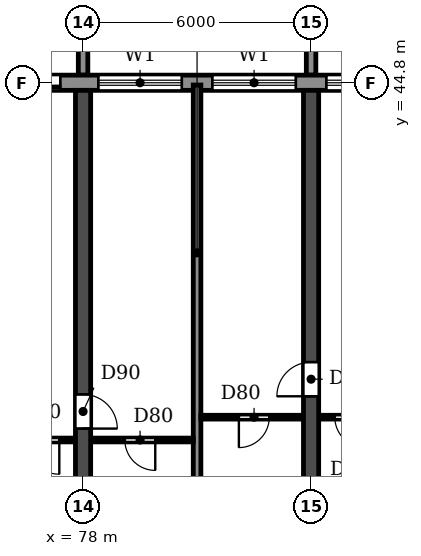
"""IFC4 building model, lengths in metres.
Left out: names, types, materials, properties, quantities, classifications, styles, units other than length and angle.
Written with IfcOpenShell. Run it as: python <this file> out.ifc"""

import sys

from ifc_helpers import new_model, si_unit, direction, frame, frame_2d, origin, place, context, subcontext, project, spatial, polyline, rectangle, outline, extrude, source, transform, mapped, element, fill, save


model = new_model("IFC4")
c1 = context("Model", 3, precision=1e-05, world=origin(), true_north=direction((0.0, 1.0)))
c2 = subcontext(c1, "Body", "Model", "MODEL_VIEW")
j1 = project(units=[si_unit("LENGTHUNIT", "METRE"), si_unit("PLANEANGLEUNIT", "RADIAN")], contexts=[c1])
p1 = place(None, origin())
s1 = spatial("IfcSite", under=j1, at=p1, CompositionType="ELEMENT")
p2 = place(p1, origin())
s2 = spatial("IfcBuilding", under=s1, at=p2, CompositionType="ELEMENT")
p3 = place(p2, frame((0.0, 0.0, 26.7)))
s3 = spatial("IfcBuildingStorey", under=s2, at=p3, CompositionType="ELEMENT", Elevation=26.7)
p4 = place(p3, frame((78.0, 30.55, 0.0), z_axis=(0.0, 0.0, 1.0), x_axis=(0.0, 1.0, 0.0)))
e1 = element("IfcWall", 1, at=p4, inside=s3, PredefinedType="SHEAR", context=c2, shape_type="SweptSolid", body=[
    extrude(rectangle(XDim=14.05, YDim=0.4, at=frame_2d((7.025, 0.0))), origin(), (0.0, 0.0, 1.0), 3.05),
])
p5 = place(p4, frame((5.15, 0.0, 0.0)))
e2 = element("IfcOpeningElement", 2, at=p5, cuts=e1, PredefinedType="OPENING", context=c2, shape_type="SweptSolid", body=[
    extrude(rectangle(XDim=0.9, YDim=2.1, at=frame_2d((0.45, 1.05))), frame((0.0, 0.21, 0.0), z_axis=(0.0, -1.0, 0.0), x_axis=(1.0, 0.0, 0.0)), (0.0, 0.0, 1.0), 0.42),
])
p6 = place(p3, frame((84.0, 30.55, 0.0), z_axis=(0.0, 0.0, 1.0), x_axis=(0.0, 1.0, 0.0)))
e3 = element("IfcWall", 3, at=p6, inside=s3, PredefinedType="SHEAR", context=c2, shape_type="SweptSolid", body=[
    extrude(rectangle(XDim=14.05, YDim=0.4, at=frame_2d((7.025, 0.0))), origin(), (0.0, 0.0, 1.0), 3.05),
])
p7 = place(p6, frame((6.0, 0.0, 0.0)))
e4 = element("IfcOpeningElement", 4, at=p7, cuts=e3, PredefinedType="OPENING", context=c2, shape_type="SweptSolid", body=[
    extrude(rectangle(XDim=0.9, YDim=2.1, at=frame_2d((0.45, 1.05))), frame((0.0, 0.21, 0.0), z_axis=(0.0, -1.0, 0.0), x_axis=(1.0, 0.0, 0.0)), (0.0, 0.0, 1.0), 0.42),
])
p8 = place(p3, frame((97.317, 44.8, 0.0), z_axis=(0.0, 0.0, 1.0), x_axis=(-1.0, 0.0, 0.0)))
e5 = element("IfcWall", 5, at=p8, inside=s3, PredefinedType="STANDARD", context=c2, shape_type="SweptSolid", body=[
    extrude(rectangle(XDim=92.634, YDim=0.4, at=frame_2d((46.317, 0.0))), origin(), (0.0, 0.0, 1.0), 3.05),
])
p9 = place(p8, frame((88.717, 0.0, 0.9)))
e6 = element("IfcOpeningElement", 6, at=p9, cuts=e5, PredefinedType="OPENING", context=c2, shape_type="SweptSolid", body=[
    extrude(rectangle(XDim=2.2, YDim=1.5, at=frame_2d((1.1, 0.75))), frame((0.0, 0.21, 0.0), z_axis=(0.0, -1.0, 0.0), x_axis=(1.0, 0.0, 0.0)), (0.0, 0.0, 1.0), 0.42),
])
p10 = place(p8, frame((85.917, 0.0, 0.0)))
e7 = element("IfcOpeningElement", 7, at=p10, cuts=e5, PredefinedType="OPENING", context=c2, shape_type="SweptSolid", body=[
    extrude(rectangle(XDim=1.8, YDim=2.4, at=frame_2d((0.9, 1.2))), frame((0.0, 0.21, 0.0), z_axis=(0.0, -1.0, 0.0), x_axis=(1.0, 0.0, 0.0)), (0.0, 0.0, 1.0), 0.42),
])
p11 = place(p8, frame((82.717, 0.0, 0.9)))
e8 = element("IfcOpeningElement", 8, at=p11, cuts=e5, PredefinedType="OPENING", context=c2, shape_type="SweptSolid", body=[
    extrude(rectangle(XDim=2.2, YDim=1.5, at=frame_2d((1.1, 0.75))), frame((0.0, 0.21, 0.0), z_axis=(0.0, -1.0, 0.0), x_axis=(1.0, 0.0, 0.0)), (0.0, 0.0, 1.0), 0.42),
])
p12 = place(p8, frame((79.717, 0.0, 0.9)))
e9 = element("IfcOpeningElement", 9, at=p12, cuts=e5, PredefinedType="OPENING", context=c2, shape_type="SweptSolid", body=[
    extrude(rectangle(XDim=2.2, YDim=1.5, at=frame_2d((1.1, 0.75))), frame((0.0, 0.21, 0.0), z_axis=(0.0, -1.0, 0.0), x_axis=(1.0, 0.0, 0.0)), (0.0, 0.0, 1.0), 0.42),
])
p13 = place(p8, frame((76.917, 0.0, 0.0)))
e10 = element("IfcOpeningElement", 10, at=p13, cuts=e5, PredefinedType="OPENING", context=c2, shape_type="SweptSolid", body=[
    extrude(rectangle(XDim=1.8, YDim=2.4, at=frame_2d((0.9, 1.2))), frame((0.0, 0.21, 0.0), z_axis=(0.0, -1.0, 0.0), x_axis=(1.0, 0.0, 0.0)), (0.0, 0.0, 1.0), 0.42),
])
p14 = place(p8, frame((73.717, 0.0, 0.9)))
e11 = element("IfcOpeningElement", 11, at=p14, cuts=e5, PredefinedType="OPENING", context=c2, shape_type="SweptSolid", body=[
    extrude(rectangle(XDim=2.2, YDim=1.5, at=frame_2d((1.1, 0.75))), frame((0.0, 0.21, 0.0), z_axis=(0.0, -1.0, 0.0), x_axis=(1.0, 0.0, 0.0)), (0.0, 0.0, 1.0), 0.42),
])
p15 = place(p8, frame((70.717, 0.0, 0.9)))
e12 = element("IfcOpeningElement", 12, at=p15, cuts=e5, PredefinedType="OPENING", context=c2, shape_type="SweptSolid", body=[
    extrude(rectangle(XDim=2.2, YDim=1.5, at=frame_2d((1.1, 0.75))), frame((0.0, 0.21, 0.0), z_axis=(0.0, -1.0, 0.0), x_axis=(1.0, 0.0, 0.0)), (0.0, 0.0, 1.0), 0.42),
])
p16 = place(p8, frame((67.717, 0.0, 0.9)))
e13 = element("IfcOpeningElement", 13, at=p16, cuts=e5, PredefinedType="OPENING", context=c2, shape_type="SweptSolid", body=[
    extrude(rectangle(XDim=2.2, YDim=1.5, at=frame_2d((1.1, 0.75))), frame((0.0, 0.21, 0.0), z_axis=(0.0, -1.0, 0.0), x_axis=(1.0, 0.0, 0.0)), (0.0, 0.0, 1.0), 0.42),
])
p17 = place(p8, frame((64.917, 0.0, 0.0)))
e14 = element("IfcOpeningElement", 14, at=p17, cuts=e5, PredefinedType="OPENING", context=c2, shape_type="SweptSolid", body=[
    extrude(rectangle(XDim=1.8, YDim=2.4, at=frame_2d((0.9, 1.2))), frame((0.0, 0.21, 0.0), z_axis=(0.0, -1.0, 0.0), x_axis=(1.0, 0.0, 0.0)), (0.0, 0.0, 1.0), 0.42),
])
p18 = place(p8, frame((61.717, 0.0, 0.9)))
e15 = element("IfcOpeningElement", 15, at=p18, cuts=e5, PredefinedType="OPENING", context=c2, shape_type="SweptSolid", body=[
    extrude(rectangle(XDim=2.2, YDim=1.5, at=frame_2d((1.1, 0.75))), frame((0.0, 0.21, 0.0), z_axis=(0.0, -1.0, 0.0), x_axis=(1.0, 0.0, 0.0)), (0.0, 0.0, 1.0), 0.42),
])
p19 = place(p8, frame((58.717, 0.0, 0.9)))
e16 = element("IfcOpeningElement", 16, at=p19, cuts=e5, PredefinedType="OPENING", context=c2, shape_type="SweptSolid", body=[
    extrude(rectangle(XDim=2.2, YDim=1.5, at=frame_2d((1.1, 0.75))), frame((0.0, 0.21, 0.0), z_axis=(0.0, -1.0, 0.0), x_axis=(1.0, 0.0, 0.0)), (0.0, 0.0, 1.0), 0.42),
])
p20 = place(p8, frame((55.917, 0.0, 0.0)))
e17 = element("IfcOpeningElement", 17, at=p20, cuts=e5, PredefinedType="OPENING", context=c2, shape_type="SweptSolid", body=[
    extrude(rectangle(XDim=1.8, YDim=2.4, at=frame_2d((0.9, 1.2))), frame((0.0, 0.21, 0.0), z_axis=(0.0, -1.0, 0.0), x_axis=(1.0, 0.0, 0.0)), (0.0, 0.0, 1.0), 0.42),
])
p21 = place(p8, frame((52.917, 0.0, 0.0)))
e18 = element("IfcOpeningElement", 18, at=p21, cuts=e5, PredefinedType="OPENING", context=c2, shape_type="SweptSolid", body=[
    extrude(rectangle(XDim=1.8, YDim=2.4, at=frame_2d((0.9, 1.2))), frame((0.0, 0.21, 0.0), z_axis=(0.0, -1.0, 0.0), x_axis=(1.0, 0.0, 0.0)), (0.0, 0.0, 1.0), 0.42),
])
p22 = place(p8, frame((49.717, 0.0, 0.9)))
e19 = element("IfcOpeningElement", 19, at=p22, cuts=e5, PredefinedType="OPENING", context=c2, shape_type="SweptSolid", body=[
    extrude(rectangle(XDim=2.2, YDim=1.5, at=frame_2d((1.1, 0.75))), frame((0.0, 0.21, 0.0), z_axis=(0.0, -1.0, 0.0), x_axis=(1.0, 0.0, 0.0)), (0.0, 0.0, 1.0), 0.42),
])
p23 = place(p8, frame((46.917, 0.0, 0.0)))
e20 = element("IfcOpeningElement", 20, at=p23, cuts=e5, PredefinedType="OPENING", context=c2, shape_type="SweptSolid", body=[
    extrude(rectangle(XDim=1.8, YDim=2.4, at=frame_2d((0.9, 1.2))), frame((0.0, 0.21, 0.0), z_axis=(0.0, -1.0, 0.0), x_axis=(1.0, 0.0, 0.0)), (0.0, 0.0, 1.0), 0.42),
])
p24 = place(p8, frame((43.717, 0.0, 0.9)))
e21 = element("IfcOpeningElement", 21, at=p24, cuts=e5, PredefinedType="OPENING", context=c2, shape_type="SweptSolid", body=[
    extrude(rectangle(XDim=2.2, YDim=1.5, at=frame_2d((1.1, 0.75))), frame((0.0, 0.21, 0.0), z_axis=(0.0, -1.0, 0.0), x_axis=(1.0, 0.0, 0.0)), (0.0, 0.0, 1.0), 0.42),
])
p25 = place(p8, frame((40.717, 0.0, 0.9)))
e22 = element("IfcOpeningElement", 22, at=p25, cuts=e5, PredefinedType="OPENING", context=c2, shape_type="SweptSolid", body=[
    extrude(rectangle(XDim=2.2, YDim=1.5, at=frame_2d((1.1, 0.75))), frame((0.0, 0.21, 0.0), z_axis=(0.0, -1.0, 0.0), x_axis=(1.0, 0.0, 0.0)), (0.0, 0.0, 1.0), 0.42),
])
p26 = place(p8, frame((37.917, 0.0, 0.0)))
e23 = element("IfcOpeningElement", 23, at=p26, cuts=e5, PredefinedType="OPENING", context=c2, shape_type="SweptSolid", body=[
    extrude(rectangle(XDim=1.8, YDim=2.4, at=frame_2d((0.9, 1.2))), frame((0.0, 0.21, 0.0), z_axis=(0.0, -1.0, 0.0), x_axis=(1.0, 0.0, 0.0)), (0.0, 0.0, 1.0), 0.42),
])
p27 = place(p8, frame((34.917, 0.0, 0.0)))
e24 = element("IfcOpeningElement", 24, at=p27, cuts=e5, PredefinedType="OPENING", context=c2, shape_type="SweptSolid", body=[
    extrude(rectangle(XDim=1.8, YDim=2.4, at=frame_2d((0.9, 1.2))), frame((0.0, 0.21, 0.0), z_axis=(0.0, -1.0, 0.0), x_axis=(1.0, 0.0, 0.0)), (0.0, 0.0, 1.0), 0.42),
])
p28 = place(p8, frame((31.717, 0.0, 0.9)))
e25 = element("IfcOpeningElement", 25, at=p28, cuts=e5, PredefinedType="OPENING", context=c2, shape_type="SweptSolid", body=[
    extrude(rectangle(XDim=2.2, YDim=1.5, at=frame_2d((1.1, 0.75))), frame((0.0, 0.21, 0.0), z_axis=(0.0, -1.0, 0.0), x_axis=(1.0, 0.0, 0.0)), (0.0, 0.0, 1.0), 0.42),
])
p29 = place(p8, frame((28.717, 0.0, 0.9)))
e26 = element("IfcOpeningElement", 26, at=p29, cuts=e5, PredefinedType="OPENING", context=c2, shape_type="SweptSolid", body=[
    extrude(rectangle(XDim=2.2, YDim=1.5, at=frame_2d((1.1, 0.75))), frame((0.0, 0.21, 0.0), z_axis=(0.0, -1.0, 0.0), x_axis=(1.0, 0.0, 0.0)), (0.0, 0.0, 1.0), 0.42),
])
p30 = place(p8, frame((25.717, 0.0, 0.9)))
e27 = element("IfcOpeningElement", 27, at=p30, cuts=e5, PredefinedType="OPENING", context=c2, shape_type="SweptSolid", body=[
    extrude(rectangle(XDim=2.2, YDim=1.5, at=frame_2d((1.1, 0.75))), frame((0.0, 0.21, 0.0), z_axis=(0.0, -1.0, 0.0), x_axis=(1.0, 0.0, 0.0)), (0.0, 0.0, 1.0), 0.42),
])
p31 = place(p8, frame((22.717, 0.0, 0.9)))
e28 = element("IfcOpeningElement", 28, at=p31, cuts=e5, PredefinedType="OPENING", context=c2, shape_type="SweptSolid", body=[
    extrude(rectangle(XDim=2.2, YDim=1.5, at=frame_2d((1.1, 0.75))), frame((0.0, 0.21, 0.0), z_axis=(0.0, -1.0, 0.0), x_axis=(1.0, 0.0, 0.0)), (0.0, 0.0, 1.0), 0.42),
])
p32 = place(p8, frame((19.917, 0.0, 0.0)))
e29 = element("IfcOpeningElement", 29, at=p32, cuts=e5, PredefinedType="OPENING", context=c2, shape_type="SweptSolid", body=[
    extrude(rectangle(XDim=1.8, YDim=2.4, at=frame_2d((0.9, 1.2))), frame((0.0, 0.21, 0.0), z_axis=(0.0, -1.0, 0.0), x_axis=(1.0, 0.0, 0.0)), (0.0, 0.0, 1.0), 0.42),
])
p33 = place(p8, frame((16.717, 0.0, 0.9)))
e30 = element("IfcOpeningElement", 30, at=p33, cuts=e5, PredefinedType="OPENING", context=c2, shape_type="SweptSolid", body=[
    extrude(rectangle(XDim=2.2, YDim=1.5, at=frame_2d((1.1, 0.75))), frame((0.0, 0.21, 0.0), z_axis=(0.0, -1.0, 0.0), x_axis=(1.0, 0.0, 0.0)), (0.0, 0.0, 1.0), 0.42),
])
p34 = place(p8, frame((13.717, 0.0, 0.9)))
e31 = element("IfcOpeningElement", 31, at=p34, cuts=e5, PredefinedType="OPENING", context=c2, shape_type="SweptSolid", body=[
    extrude(rectangle(XDim=2.2, YDim=1.5, at=frame_2d((1.1, 0.75))), frame((0.0, 0.21, 0.0), z_axis=(0.0, -1.0, 0.0), x_axis=(1.0, 0.0, 0.0)), (0.0, 0.0, 1.0), 0.42),
])
p35 = place(p8, frame((10.717, 0.0, 0.9)))
e32 = element("IfcOpeningElement", 32, at=p35, cuts=e5, PredefinedType="OPENING", context=c2, shape_type="SweptSolid", body=[
    extrude(rectangle(XDim=2.2, YDim=1.5, at=frame_2d((1.1, 0.75))), frame((0.0, 0.21, 0.0), z_axis=(0.0, -1.0, 0.0), x_axis=(1.0, 0.0, 0.0)), (0.0, 0.0, 1.0), 0.42),
])
p36 = place(p8, frame((7.917, 0.0, 0.0)))
e33 = element("IfcOpeningElement", 33, at=p36, cuts=e5, PredefinedType="OPENING", context=c2, shape_type="SweptSolid", body=[
    extrude(rectangle(XDim=1.8, YDim=2.4, at=frame_2d((0.9, 1.2))), frame((0.0, 0.21, 0.0), z_axis=(0.0, -1.0, 0.0), x_axis=(1.0, 0.0, 0.0)), (0.0, 0.0, 1.0), 0.42),
])
p37 = place(p8, frame((4.917, 0.0, 0.0)))
e34 = element("IfcOpeningElement", 34, at=p37, cuts=e5, PredefinedType="OPENING", context=c2, shape_type="SweptSolid", body=[
    extrude(rectangle(XDim=1.8, YDim=2.4, at=frame_2d((0.9, 1.2))), frame((0.0, 0.21, 0.0), z_axis=(0.0, -1.0, 0.0), x_axis=(1.0, 0.0, 0.0)), (0.0, 0.0, 1.0), 0.42),
])
p38 = place(p8, frame((1.717, 0.0, 0.9)))
e35 = element("IfcOpeningElement", 35, at=p38, cuts=e5, PredefinedType="OPENING", context=c2, shape_type="SweptSolid", body=[
    extrude(rectangle(XDim=2.2, YDim=1.5, at=frame_2d((1.1, 0.75))), frame((0.0, 0.21, 0.0), z_axis=(0.0, -1.0, 0.0), x_axis=(1.0, 0.0, 0.0)), (0.0, 0.0, 1.0), 0.42),
])
m1 = source(origin(), c2, "Body", "SweptSolid", [
    extrude(outline(polyline([(0.0, 0.0), (0.25, 0.0), (0.25, 3.1), (0.0, 3.1), (0.0, 0.0)])), origin(), (0.0, 0.0, 1.0), 3.1),
])
for number, where in (
    (36, (77.875, 45.0, 0.0)),
    (37, (83.875, 45.0, 0.0)),
):
    element("IfcWall", number, at=place(p3, frame(where)), inside=s3, PredefinedType="STANDARD", context=c2, shape_type="MappedRepresentation", body=[
        mapped(m1, transform((0.0, 0.0, 0.0))),
    ])
p39 = place(p3, frame((81.0, 30.56, 0.0), z_axis=(0.0, 0.0, 1.0), x_axis=(0.0, 1.0, 0.0)))
e38 = element("IfcWall", 38, at=p39, inside=s3, PredefinedType="PARTITIONING", context=c2, shape_type="SweptSolid", body=[
    extrude(rectangle(XDim=14.18, YDim=0.2, at=frame_2d((7.09, 0.0))), origin(), (0.0, 0.0, 1.0), 3.05),
])
p40 = place(p3, frame((75.8, 35.4, 0.0), z_axis=(0.0, 0.0, 1.0), x_axis=(1.0, 0.0, 0.0)))
e39 = element("IfcWall", 39, at=p40, inside=s3, PredefinedType="PARTITIONING", context=c2, shape_type="SweptSolid", body=[
    extrude(rectangle(XDim=1.99, YDim=0.1, at=frame_2d((0.995, 0.0))), origin(), (0.0, 0.0, 1.0), 3.05),
])
p41 = place(p40, frame((0.675, 0.0, 0.0)))
e40 = element("IfcOpeningElement", 40, at=p41, cuts=e39, PredefinedType="OPENING", context=c2, shape_type="SweptSolid", body=[
    extrude(rectangle(XDim=0.9, YDim=2.1, at=frame_2d((0.45, 1.05))), frame((0.0, 0.06, 0.0), z_axis=(0.0, -1.0, 0.0), x_axis=(1.0, 0.0, 0.0)), (0.0, 0.0, 1.0), 0.12),
])
p42 = place(p3, frame((78.21, 35.4, 0.0), z_axis=(0.0, 0.0, 1.0), x_axis=(1.0, 0.0, 0.0)))
e41 = element("IfcWall", 41, at=p42, inside=s3, PredefinedType="PARTITIONING", context=c2, shape_type="SweptSolid", body=[
    extrude(rectangle(XDim=2.69, YDim=0.1, at=frame_2d((1.345, 0.0))), origin(), (0.0, 0.0, 1.0), 3.05),
])
p43 = place(p42, frame((0.89, 0.0, 0.0)))
e42 = element("IfcOpeningElement", 42, at=p43, cuts=e41, PredefinedType="OPENING", context=c2, shape_type="SweptSolid", body=[
    extrude(rectangle(XDim=0.8, YDim=2.1, at=frame_2d((0.4, 1.05))), frame((0.0, 0.06, 0.0), z_axis=(0.0, -1.0, 0.0), x_axis=(1.0, 0.0, 0.0)), (0.0, 0.0, 1.0), 0.12),
])
p44 = place(p3, frame((81.1, 36.0, 0.0), z_axis=(0.0, 0.0, 1.0), x_axis=(1.0, 0.0, 0.0)))
e43 = element("IfcWall", 43, at=p44, inside=s3, PredefinedType="PARTITIONING", context=c2, shape_type="SweptSolid", body=[
    extrude(rectangle(XDim=2.69, YDim=0.1, at=frame_2d((1.345, 0.0))), origin(), (0.0, 0.0, 1.0), 3.05),
])
p45 = place(p44, frame((1.0, 0.0, 0.0)))
e44 = element("IfcOpeningElement", 44, at=p45, cuts=e43, PredefinedType="OPENING", context=c2, shape_type="SweptSolid", body=[
    extrude(rectangle(XDim=0.8, YDim=2.1, at=frame_2d((0.4, 1.05))), frame((0.0, 0.06, 0.0), z_axis=(0.0, -1.0, 0.0), x_axis=(1.0, 0.0, 0.0)), (0.0, 0.0, 1.0), 0.12),
])
p46 = place(p3, frame((84.21, 36.0, 0.0), z_axis=(0.0, 0.0, 1.0), x_axis=(1.0, 0.0, 0.0)))
e45 = element("IfcWall", 45, at=p46, inside=s3, PredefinedType="PARTITIONING", context=c2, shape_type="SweptSolid", body=[
    extrude(rectangle(XDim=1.89, YDim=0.1, at=frame_2d((0.945, 0.0))), origin(), (0.0, 0.0, 1.0), 3.05),
])
p47 = place(p46, frame((0.415, 0.0, 0.0)))
e46 = element("IfcOpeningElement", 46, at=p47, cuts=e45, PredefinedType="OPENING", context=c2, shape_type="SweptSolid", body=[
    extrude(rectangle(XDim=0.8, YDim=2.1, at=frame_2d((0.4, 1.05))), frame((0.0, 0.06, 0.0), z_axis=(0.0, -1.0, 0.0), x_axis=(1.0, 0.0, 0.0)), (0.0, 0.0, 1.0), 0.12),
])
p48 = place(p32, origin())
e47 = element("IfcDoor", 47, at=p48, inside=s3, OperationType="DOUBLE_DOOR_SLIDING", PredefinedType="DOOR", context=c2, shape_type="SweptSolid", body=[
    extrude(rectangle(XDim=1.8, YDim=2.4, at=frame_2d((0.9, 1.2))), frame((0.0, 0.025, 0.0), z_axis=(0.0, -1.0, 0.0), x_axis=(1.0, 0.0, 0.0)), (0.0, 0.0, 1.0), 0.05),
])
fill(e29, e47)
p49 = place(p33, origin())
e48 = element("IfcWindow", 48, at=p49, inside=s3, PartitioningType="DOUBLE_PANEL_HORIZONTAL", PredefinedType="WINDOW", context=c2, shape_type="SweptSolid", body=[
    extrude(rectangle(XDim=2.2, YDim=1.5, at=frame_2d((1.1, 0.75))), frame((0.0, 0.03, 0.0), z_axis=(0.0, -1.0, 0.0), x_axis=(1.0, 0.0, 0.0)), (0.0, 0.0, 1.0), 0.06),
])
fill(e30, e48)
p50 = place(p34, origin())
e49 = element("IfcWindow", 49, at=p50, inside=s3, PartitioningType="DOUBLE_PANEL_HORIZONTAL", PredefinedType="WINDOW", context=c2, shape_type="SweptSolid", body=[
    extrude(rectangle(XDim=2.2, YDim=1.5, at=frame_2d((1.1, 0.75))), frame((0.0, 0.03, 0.0), z_axis=(0.0, -1.0, 0.0), x_axis=(1.0, 0.0, 0.0)), (0.0, 0.0, 1.0), 0.06),
])
fill(e31, e49)
p51 = place(p35, origin())
e50 = element("IfcWindow", 50, at=p51, inside=s3, PartitioningType="DOUBLE_PANEL_HORIZONTAL", PredefinedType="WINDOW", context=c2, shape_type="SweptSolid", body=[
    extrude(rectangle(XDim=2.2, YDim=1.5, at=frame_2d((1.1, 0.75))), frame((0.0, 0.03, 0.0), z_axis=(0.0, -1.0, 0.0), x_axis=(1.0, 0.0, 0.0)), (0.0, 0.0, 1.0), 0.06),
])
fill(e32, e50)
p52 = place(p43, frame((0.8, 0.0, 0.0), z_axis=(0.0, 0.0, 1.0), x_axis=(-1.0, 0.0, 0.0)))
e51 = element("IfcDoor", 51, at=p52, inside=s3, OperationType="SINGLE_SWING_LEFT", PredefinedType="DOOR", context=c2, shape_type="SweptSolid", body=[
    extrude(rectangle(XDim=0.8, YDim=2.1, at=frame_2d((0.4, 1.05))), frame((0.0, 0.025, 0.0), z_axis=(0.0, -1.0, 0.0), x_axis=(1.0, 0.0, 0.0)), (0.0, 0.0, 1.0), 0.05),
])
fill(e42, e51)
p53 = place(p41, frame((0.9, 0.0, 0.0), z_axis=(0.0, 0.0, 1.0), x_axis=(-1.0, 0.0, 0.0)))
e52 = element("IfcDoor", 52, at=p53, inside=s3, OperationType="SINGLE_SWING_LEFT", PredefinedType="DOOR", context=c2, shape_type="SweptSolid", body=[
    extrude(rectangle(XDim=0.9, YDim=2.1, at=frame_2d((0.45, 1.05))), frame((0.0, 0.025, 0.0), z_axis=(0.0, -1.0, 0.0), x_axis=(1.0, 0.0, 0.0)), (0.0, 0.0, 1.0), 0.05),
])
fill(e40, e52)
p54 = place(p5, frame((0.9, 0.0, 0.0), z_axis=(0.0, 0.0, 1.0), x_axis=(-1.0, 0.0, 0.0)))
e53 = element("IfcDoor", 53, at=p54, inside=s3, OperationType="SINGLE_SWING_RIGHT", PredefinedType="DOOR", context=c2, shape_type="SweptSolid", body=[
    extrude(rectangle(XDim=0.9, YDim=2.1, at=frame_2d((0.45, 1.05))), frame((0.0, 0.025, 0.0), z_axis=(0.0, -1.0, 0.0), x_axis=(1.0, 0.0, 0.0)), (0.0, 0.0, 1.0), 0.05),
])
fill(e2, e53)
p55 = place(p45, frame((0.8, 0.0, 0.0), z_axis=(0.0, 0.0, 1.0), x_axis=(-1.0, 0.0, 0.0)))
e54 = element("IfcDoor", 54, at=p55, inside=s3, OperationType="SINGLE_SWING_RIGHT", PredefinedType="DOOR", context=c2, shape_type="SweptSolid", body=[
    extrude(rectangle(XDim=0.8, YDim=2.1, at=frame_2d((0.4, 1.05))), frame((0.0, 0.025, 0.0), z_axis=(0.0, -1.0, 0.0), x_axis=(1.0, 0.0, 0.0)), (0.0, 0.0, 1.0), 0.05),
])
fill(e44, e54)
p56 = place(p7, origin())
e55 = element("IfcDoor", 55, at=p56, inside=s3, OperationType="SINGLE_SWING_LEFT", PredefinedType="DOOR", context=c2, shape_type="SweptSolid", body=[
    extrude(rectangle(XDim=0.9, YDim=2.1, at=frame_2d((0.45, 1.05))), frame((0.0, 0.025, 0.0), z_axis=(0.0, -1.0, 0.0), x_axis=(1.0, 0.0, 0.0)), (0.0, 0.0, 1.0), 0.05),
])
fill(e4, e55)
p57 = place(p47, frame((0.8, 0.0, 0.0), z_axis=(0.0, 0.0, 1.0), x_axis=(-1.0, 0.0, 0.0)))
e56 = element("IfcDoor", 56, at=p57, inside=s3, OperationType="SINGLE_SWING_LEFT", PredefinedType="DOOR", context=c2, shape_type="SweptSolid", body=[
    extrude(rectangle(XDim=0.8, YDim=2.1, at=frame_2d((0.4, 1.05))), frame((0.0, 0.025, 0.0), z_axis=(0.0, -1.0, 0.0), x_axis=(1.0, 0.0, 0.0)), (0.0, 0.0, 1.0), 0.05),
])
fill(e46, e56)
save(model, sys.argv[1])
